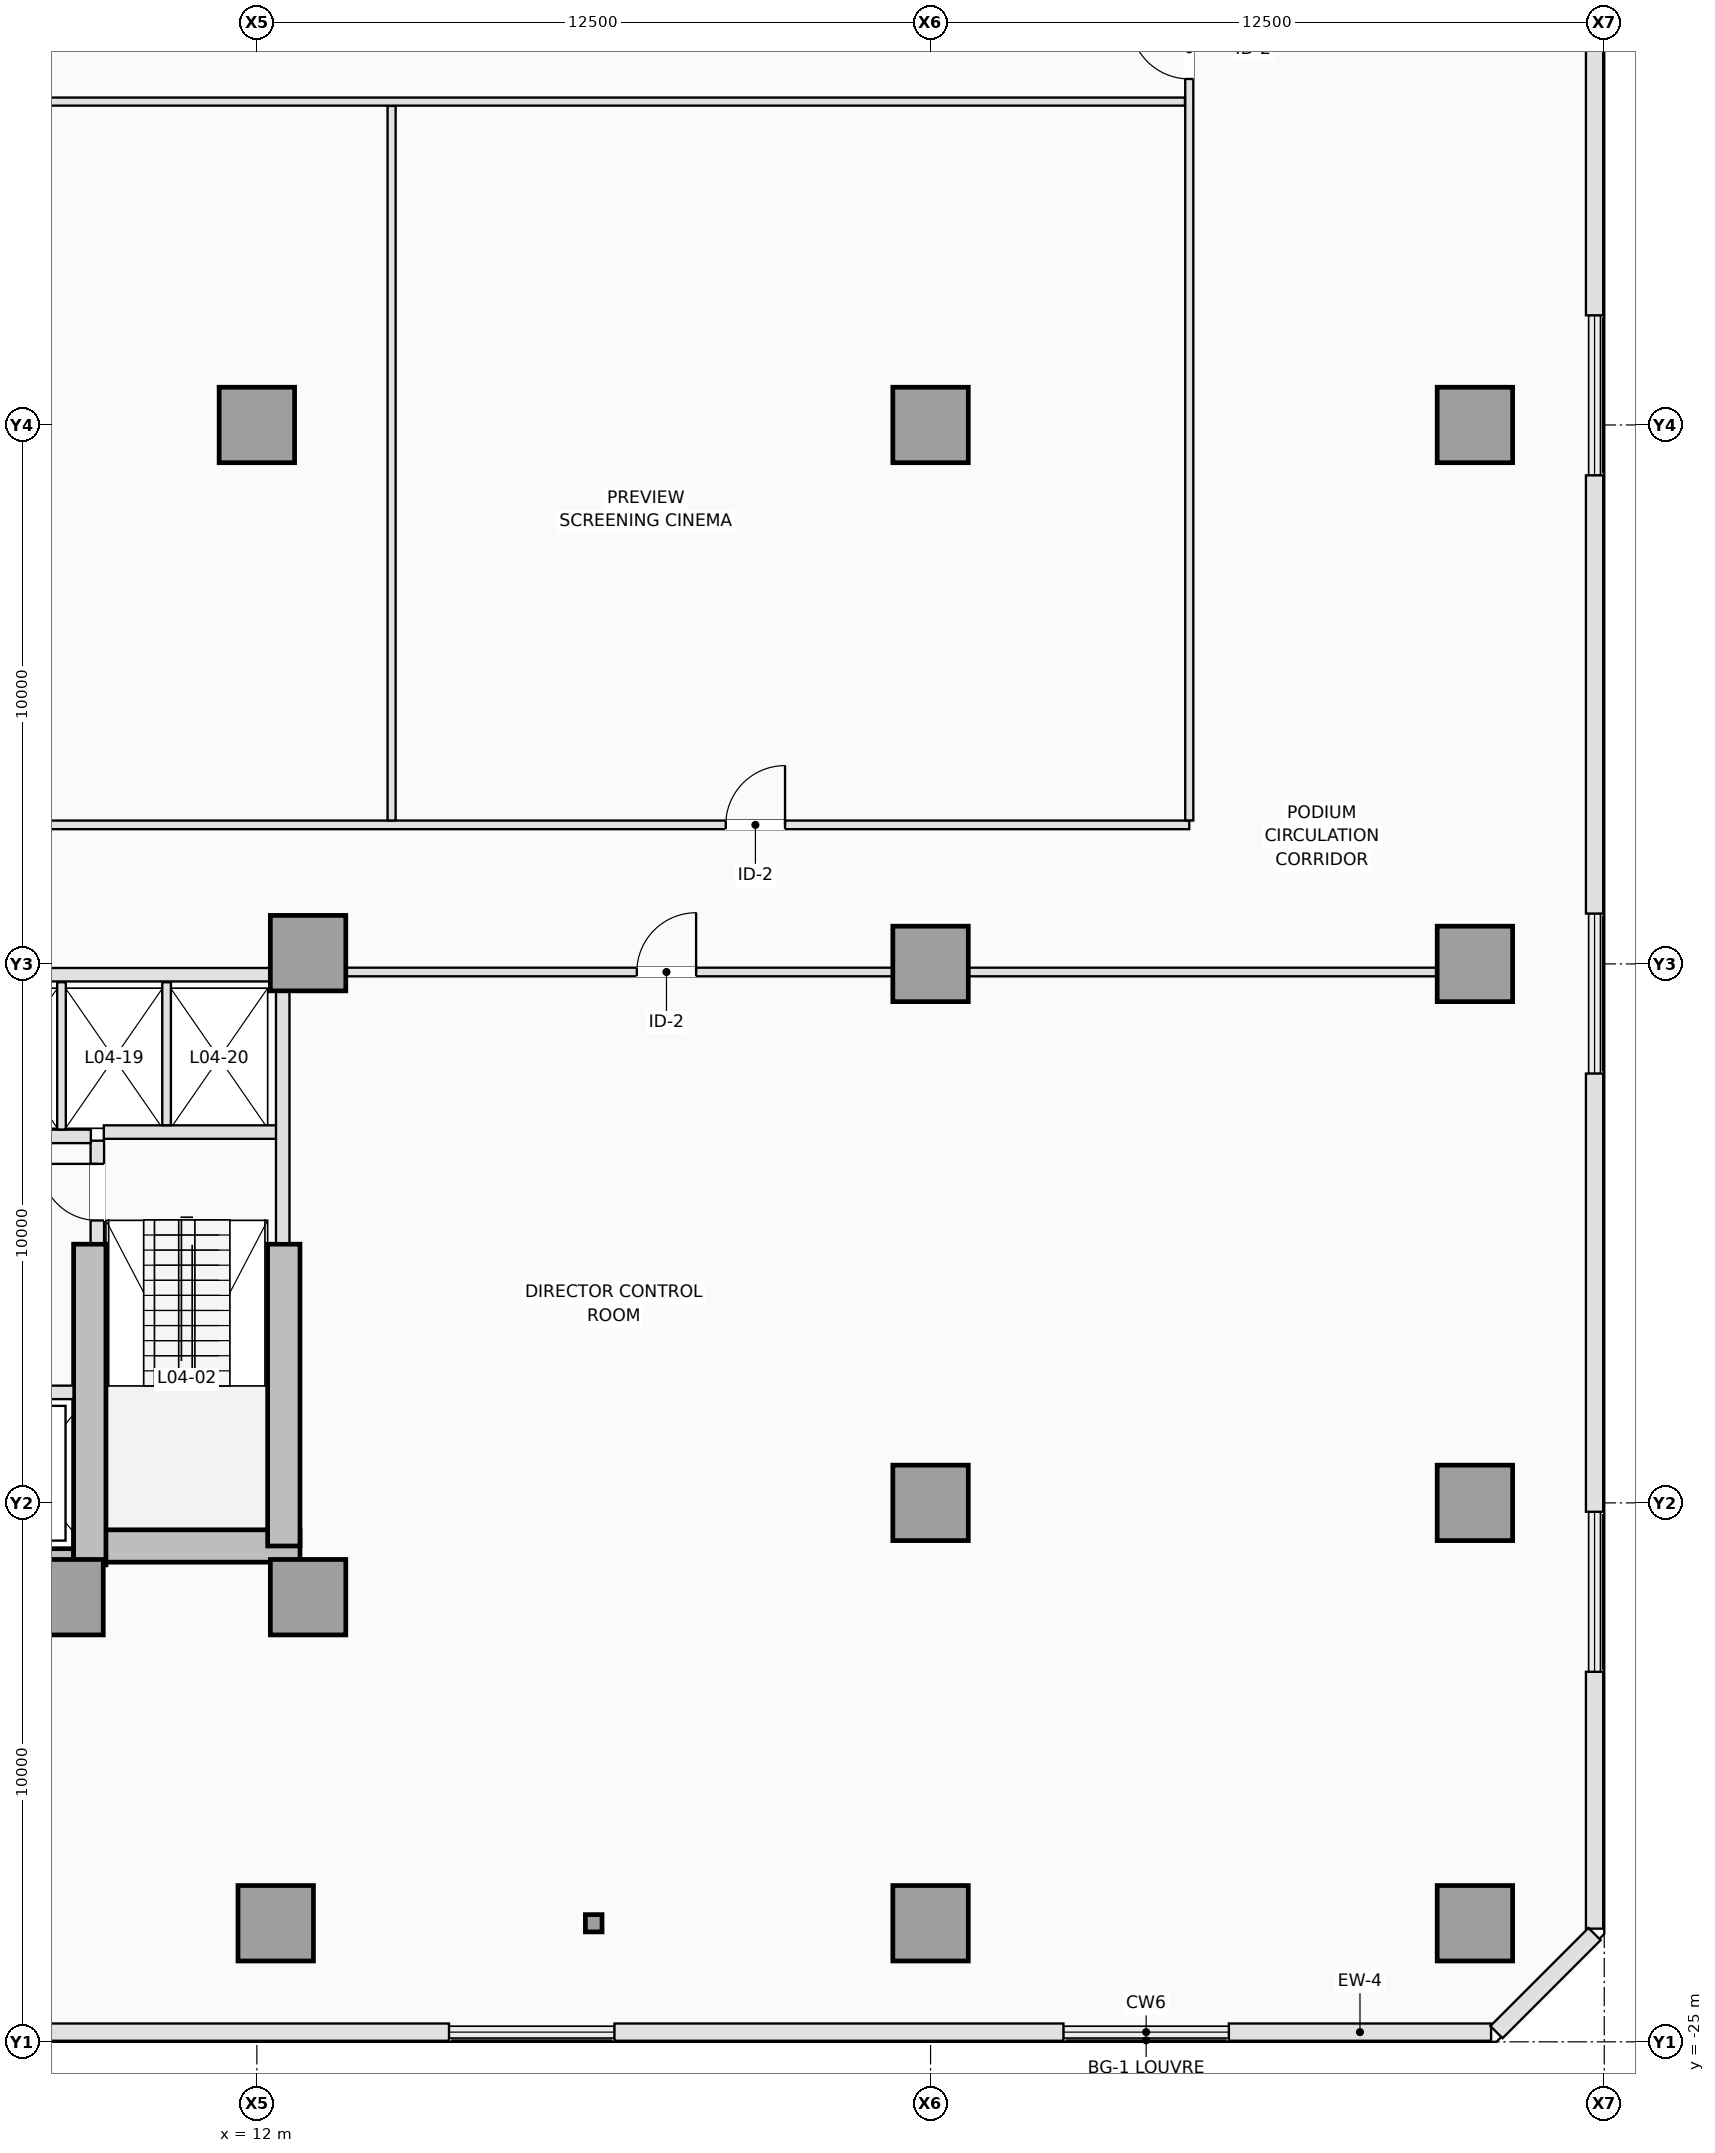
"""IFC4 building model, lengths in metres.
Left out: names, types, materials, properties, quantities, classifications, styles, units other than length and angle.
Written with IfcOpenShell. Run it as: python <this file> out.ifc"""

import sys

from ifc_helpers import new_model, si_unit, direction, frame, frame_2d, origin, origin_2d, place, context, subcontext, project, spatial, rectangle, i_section, extrude, element, fill, save


model = new_model("IFC4")
c1 = context("Model", 3, precision=1e-05, world=origin(), true_north=direction((0.0, 1.0)))
c2 = subcontext(c1, "Body", "Model", "MODEL_VIEW")
j1 = project(units=[si_unit("LENGTHUNIT", "METRE"), si_unit("PLANEANGLEUNIT", "RADIAN")], contexts=[c1])
p1 = place(None, origin())
s1 = spatial("IfcSite", under=j1, at=p1, CompositionType="ELEMENT")
p2 = place(p1, origin())
s2 = spatial("IfcBuilding", under=s1, at=p2, CompositionType="ELEMENT")
p3 = place(p2, frame((0.0, 0.0, 18.5)))
s3 = spatial("IfcBuildingStorey", under=s2, at=p3, CompositionType="ELEMENT", Elevation=18.5)
p4 = place(p3, frame((3.75, -16.15, 0.0), z_axis=(0.0, 0.0, 1.0), x_axis=(1.0, 0.0, 0.0)))
e1 = element("IfcWall", 1, at=p4, inside=s3, PredefinedType="SHEAR", context=c2, shape_type="SweptSolid", body=[
    extrude(rectangle(XDim=5.15, YDim=0.6, at=frame_2d((2.575, 0.0))), origin(), (0.0, 0.0, 1.0), 4.5),
])
p5 = place(p3, frame((8.6, -15.8, 0.0), z_axis=(0.0, 0.0, 1.0), x_axis=(1.0, 0.0, 0.0)))
e2 = element("IfcWall", 2, at=p5, inside=s3, PredefinedType="SHEAR", context=c2, shape_type="SweptSolid", body=[
    extrude(rectangle(XDim=4.2, YDim=0.6, at=frame_2d((2.1, 0.0))), origin(), (0.0, 0.0, 1.0), 4.5),
])
p6 = place(p3, frame((12.5, -15.8, 0.0), z_axis=(0.0, 0.0, 1.0), x_axis=(0.0, 1.0, 0.0)))
e3 = element("IfcWall", 3, at=p6, inside=s3, PredefinedType="SHEAR", context=c2, shape_type="SweptSolid", body=[
    extrude(rectangle(XDim=5.6, YDim=0.6, at=frame_2d((2.8, 0.0))), origin(), (0.0, 0.0, 1.0), 4.5),
])
p7 = place(p3, frame((8.9, -16.15, 0.0), z_axis=(0.0, 0.0, 1.0), x_axis=(0.0, 1.0, 0.0)))
e4 = element("IfcWall", 4, at=p7, inside=s3, PredefinedType="SHEAR", context=c2, shape_type="SweptSolid", body=[
    extrude(rectangle(XDim=5.95, YDim=0.6, at=frame_2d((2.975, 0.0))), origin(), (0.0, 0.0, 1.0), 4.5),
])
for number, where, z_axis, x_axis in (
    (5, (8.45, -16.75, 0.0), (0.0, 0.0, 1.0), (1.0, 0.0, 0.0)),
    (6, (12.95, -16.75, 0.0), (0.0, 0.0, 1.0), (1.0, 0.0, 0.0)),
    (7, (12.95, -4.8, 0.0), (0.0, 0.0, 1.0), (1.0, 0.0, 0.0)),
    (8, (12.35, -22.8, 0.0), (0.0, 0.0, 1.0), (1.0, 0.0, 0.0)),
    (9, (24.5, -22.8, 0.0), (0.0, 0.0, 1.0), (1.0, 0.0, 0.0)),
    (10, (34.6, -22.8, 0.0), (0.0, 0.0, 1.0), (1.0, 0.0, 0.0)),
    (11, (24.5, -15.0, 0.0), (0.0, 0.0, 1.0), (1.0, 0.0, 0.0)),
    (12, (34.6, -15.0, 0.0), (0.0, 0.0, 1.0), (1.0, 0.0, 0.0)),
    (13, (24.5, -5.0, 0.0), (0.0, 0.0, 1.0), (1.0, 0.0, 0.0)),
    (14, (34.6, -5.0, 0.0), (0.0, 0.0, 1.0), (1.0, 0.0, 0.0)),
    (15, (12.0, 5.0, 0.0), (0.0, 0.0, 1.0), (1.0, 0.0, 0.0)),
    (16, (24.5, 5.0, 0.0), (0.0, 0.0, 1.0), (1.0, 0.0, 0.0)),
    (17, (34.6, 5.0, 0.0), (0.0, 0.0, 1.0), (1.0, 0.0, 0.0)),
):
    element("IfcColumn", number, at=place(p3, frame(where, z_axis=z_axis, x_axis=x_axis)), inside=s3, PredefinedType="COLUMN", context=c2, shape_type="SweptSolid", body=[
        extrude(rectangle(XDim=1.4, YDim=1.4, at=origin_2d()), origin(), (0.0, 0.0, 1.0), 4.5),
    ])
p8 = place(p3, frame((18.25, -22.8, 0.0), z_axis=(0.0, 0.0, 1.0), x_axis=(1.0, 0.0, 0.0)))
e18 = element("IfcColumn", 18, at=p8, inside=s3, PredefinedType="COLUMN", context=c2, shape_type="SweptSolid", body=[
    extrude(i_section(OverallWidth=0.309, OverallDepth=0.321, WebThickness=0.014, FlangeThickness=0.022, FilletRadius=0.017, at=origin_2d()), origin(), (0.0, 0.0, 1.0), 4.5),
])
p9 = place(p3, frame((34.9, -24.82, 0.0), z_axis=(0.0, 0.0, 1.0), x_axis=(-1.0, 0.0, 0.0)))
e19 = element("IfcWall", 19, at=p9, inside=s3, PredefinedType="STANDARD", context=c2, shape_type="SweptSolid", body=[
    extrude(rectangle(XDim=4.865, YDim=0.32, at=frame_2d((2.433, 0.0))), origin(), (0.0, 0.0, 1.0), 4.08),
])
p10 = place(p3, frame((26.965, -24.82, 0.0), z_axis=(0.0, 0.0, 1.0), x_axis=(-1.0, 0.0, 0.0)))
e20 = element("IfcWall", 20, at=p10, inside=s3, PredefinedType="STANDARD", context=c2, shape_type="SweptSolid", body=[
    extrude(rectangle(XDim=8.33, YDim=0.32, at=frame_2d((4.165, 0.0))), origin(), (0.0, 0.0, 1.0), 4.08),
])
p11 = place(p3, frame((15.565, -24.82, 0.0), z_axis=(0.0, 0.0, 1.0), x_axis=(-1.0, 0.0, 0.0)))
e21 = element("IfcWall", 21, at=p11, inside=s3, PredefinedType="STANDARD", context=c2, shape_type="SweptSolid", body=[
    extrude(rectangle(XDim=8.33, YDim=0.32, at=frame_2d((4.165, 0.0))), origin(), (0.0, 0.0, 1.0), 4.08),
])
p12 = place(p3, frame((36.82, 15.165, 0.0), z_axis=(0.0, 0.0, 1.0), x_axis=(0.0, -1.0, 0.0)))
e22 = element("IfcWall", 22, at=p12, inside=s3, PredefinedType="STANDARD", context=c2, shape_type="SweptSolid", body=[
    extrude(rectangle(XDim=8.131, YDim=0.32, at=frame_2d((4.065, 0.0))), origin(), (0.0, 0.0, 1.0), 4.08),
])
p13 = place(p3, frame((36.82, 4.065, 0.0), z_axis=(0.0, 0.0, 1.0), x_axis=(0.0, -1.0, 0.0)))
e23 = element("IfcWall", 23, at=p13, inside=s3, PredefinedType="STANDARD", context=c2, shape_type="SweptSolid", body=[
    extrude(rectangle(XDim=8.131, YDim=0.32, at=frame_2d((4.065, 0.0))), origin(), (0.0, 0.0, 1.0), 4.08),
])
p14 = place(p3, frame((36.82, -7.035, 0.0), z_axis=(0.0, 0.0, 1.0), x_axis=(0.0, -1.0, 0.0)))
e24 = element("IfcWall", 24, at=p14, inside=s3, PredefinedType="STANDARD", context=c2, shape_type="SweptSolid", body=[
    extrude(rectangle(XDim=8.131, YDim=0.32, at=frame_2d((4.065, 0.0))), origin(), (0.0, 0.0, 1.0), 4.08),
])
p15 = place(p3, frame((36.82, -18.135, 0.0), z_axis=(0.0, 0.0, 1.0), x_axis=(0.0, -1.0, 0.0)))
e25 = element("IfcWall", 25, at=p15, inside=s3, PredefinedType="STANDARD", context=c2, shape_type="SweptSolid", body=[
    extrude(rectangle(XDim=4.765, YDim=0.32, at=frame_2d((2.383, 0.0))), origin(), (0.0, 0.0, 1.0), 4.08),
])
p16 = place(p3, frame((36.82, -23.0, 0.0), z_axis=(0.0, 0.0, 1.0), x_axis=(-0.707106781187, -0.707106781187, 0.0)))
e26 = element("IfcWall", 26, at=p16, inside=s3, PredefinedType="STANDARD", context=c2, shape_type="SweptSolid", body=[
    extrude(rectangle(XDim=2.574, YDim=0.32, at=frame_2d((1.287, 0.0))), origin(), (0.0, 0.0, 1.0), 4.08),
])
p17 = place(p3, frame((9.04, -10.18, 0.0), z_axis=(0.0, 0.0, 1.0), x_axis=(0.0, 1.0, 0.0)))
e27 = element("IfcWall", 27, at=p17, inside=s3, PredefinedType="PARTITIONING", context=c2, shape_type="SweptSolid", body=[
    extrude(rectangle(XDim=1.9, YDim=0.25, at=frame_2d((0.95, 0.0))), origin(), (0.0, 0.0, 1.0), 4.08),
])
p18 = place(p17, frame((0.42, 0.0, 0.0)))
e28 = element("IfcOpeningElement", 28, at=p18, cuts=e27, PredefinedType="OPENING", context=c2, shape_type="SweptSolid", body=[
    extrude(rectangle(XDim=1.05, YDim=2.15, at=frame_2d((0.525, 1.075))), frame((0.0, 0.135, 0.0), z_axis=(0.0, -1.0, 0.0), x_axis=(1.0, 0.0, 0.0)), (0.0, 0.0, 1.0), 0.27),
])
p19 = place(p3, frame((9.16, -8.12, 0.0), z_axis=(0.0, 0.0, 1.0), x_axis=(1.0, 0.0, 0.0)))
e29 = element("IfcWall", 29, at=p19, inside=s3, PredefinedType="PARTITIONING", context=c2, shape_type="SweptSolid", body=[
    extrude(rectangle(XDim=3.22, YDim=0.25, at=frame_2d((1.61, 0.0))), origin(), (0.0, 0.0, 1.0), 4.08),
])
p20 = place(p3, frame((12.48, -10.18, 0.0), z_axis=(0.0, 0.0, 1.0), x_axis=(0.0, 1.0, 0.0)))
e30 = element("IfcWall", 30, at=p20, inside=s3, PredefinedType="PARTITIONING", context=c2, shape_type="SweptSolid", body=[
    extrude(rectangle(XDim=4.678, YDim=0.25, at=frame_2d((2.339, 0.0))), origin(), (0.0, 0.0, 1.0), 4.08),
])
p21 = place(p3, frame((3.68, -12.95, 0.0), z_axis=(0.0, 0.0, 1.0), x_axis=(1.0, 0.0, 0.0)))
e31 = element("IfcWall", 31, at=p21, inside=s3, PredefinedType="PARTITIONING", context=c2, shape_type="SweptSolid", body=[
    extrude(rectangle(XDim=4.918, YDim=0.25, at=frame_2d((2.459, 0.0))), origin(), (0.0, 0.0, 1.0), 4.08),
])
p22 = place(p21, frame((3.32, 0.0, 0.0)))
e32 = element("IfcOpeningElement", 32, at=p22, cuts=e31, PredefinedType="OPENING", context=c2, shape_type="SweptSolid", body=[
    extrude(rectangle(XDim=1.1, YDim=2.15, at=frame_2d((0.55, 1.075))), frame((0.0, 0.135, 0.0), z_axis=(0.0, -1.0, 0.0), x_axis=(1.0, 0.0, 0.0)), (0.0, 0.0, 1.0), 0.27),
])
p23 = place(p21, frame((0.67, 0.0, 0.0)))
e33 = element("IfcOpeningElement", 33, at=p23, cuts=e31, PredefinedType="OPENING", context=c2, shape_type="SweptSolid", body=[
    extrude(rectangle(XDim=1.2, YDim=2.15, at=frame_2d((0.6, 1.075))), frame((0.0, 0.135, 0.0), z_axis=(0.0, -1.0, 0.0), x_axis=(1.0, 0.0, 0.0)), (0.0, 0.0, 1.0), 0.27),
])
p24 = place(p3, frame((3.68, -8.2, 0.0), z_axis=(0.0, 0.0, 1.0), x_axis=(1.0, 0.0, 0.0)))
e34 = element("IfcWall", 34, at=p24, inside=s3, PredefinedType="PARTITIONING", context=c2, shape_type="SweptSolid", body=[
    extrude(rectangle(XDim=5.24, YDim=0.25, at=frame_2d((2.62, 0.0))), origin(), (0.0, 0.0, 1.0), 4.08),
])
p25 = place(p3, frame((4.452, -5.2, 0.0), z_axis=(0.0, 0.0, 1.0), x_axis=(1.0, 0.0, 0.0)))
e35 = element("IfcWall", 35, at=p25, inside=s3, PredefinedType="PARTITIONING", context=c2, shape_type="SweptSolid", body=[
    extrude(rectangle(XDim=7.796, YDim=0.25, at=frame_2d((3.898, 0.0))), origin(), (0.0, 0.0, 1.0), 4.08),
])
p26 = place(p3, frame((8.375, -8.073, 0.0), z_axis=(0.0, 0.0, 1.0), x_axis=(0.0, 1.0, 0.0)))
e36 = element("IfcWall", 36, at=p26, inside=s3, PredefinedType="PARTITIONING", context=c2, shape_type="SweptSolid", body=[
    extrude(rectangle(XDim=2.733, YDim=0.16, at=frame_2d((1.366, 0.0))), origin(), (0.0, 0.0, 1.0), 4.08),
])
p27 = place(p3, frame((10.325, -7.993, 0.0), z_axis=(0.0, 0.0, 1.0), x_axis=(0.0, 1.0, 0.0)))
e37 = element("IfcWall", 37, at=p27, inside=s3, PredefinedType="PARTITIONING", context=c2, shape_type="SweptSolid", body=[
    extrude(rectangle(XDim=2.653, YDim=0.16, at=frame_2d((1.326, 0.0))), origin(), (0.0, 0.0, 1.0), 4.08),
])
p28 = place(p3, frame((-29.3, -2.42, 0.0), z_axis=(0.0, 0.0, 1.0), x_axis=(1.0, 0.0, 0.0)))
e38 = element("IfcWall", 38, at=p28, inside=s3, PredefinedType="PARTITIONING", context=c2, shape_type="SweptSolid", body=[
    extrude(rectangle(XDim=58.6, YDim=0.16, at=frame_2d((29.3, 0.0))), origin(), (0.0, 0.0, 1.0), 4.08),
])
p29 = place(p28, frame((5.5, 0.0, 0.0)))
e39 = element("IfcOpeningElement", 39, at=p29, cuts=e38, PredefinedType="OPENING", context=c2, shape_type="SweptSolid", body=[
    extrude(rectangle(XDim=1.1, YDim=2.15, at=frame_2d((0.55, 1.075))), frame((0.0, 0.09, 0.0), z_axis=(0.0, -1.0, 0.0), x_axis=(1.0, 0.0, 0.0)), (0.0, 0.0, 1.0), 0.18),
])
p30 = place(p28, frame((50.0, 0.0, 0.0)))
e40 = element("IfcOpeningElement", 40, at=p30, cuts=e38, PredefinedType="OPENING", context=c2, shape_type="SweptSolid", body=[
    extrude(rectangle(XDim=1.1, YDim=2.15, at=frame_2d((0.55, 1.075))), frame((0.0, 0.09, 0.0), z_axis=(0.0, -1.0, 0.0), x_axis=(1.0, 0.0, 0.0)), (0.0, 0.0, 1.0), 0.18),
])
p31 = place(p3, frame((13.652, -5.15, 0.0), z_axis=(0.0, 0.0, 1.0), x_axis=(1.0, 0.0, 0.0)))
e41 = element("IfcWall", 41, at=p31, inside=s3, PredefinedType="PARTITIONING", context=c2, shape_type="SweptSolid", body=[
    extrude(rectangle(XDim=10.146, YDim=0.16, at=frame_2d((5.073, 0.0))), origin(), (0.0, 0.0, 1.0), 3.056),
])
p32 = place(p31, frame((5.398, 0.0, 0.0)))
e42 = element("IfcOpeningElement", 42, at=p32, cuts=e41, PredefinedType="OPENING", context=c2, shape_type="SweptSolid", body=[
    extrude(rectangle(XDim=1.1, YDim=2.15, at=frame_2d((0.55, 1.075))), frame((0.0, 0.09, 0.0), z_axis=(0.0, -1.0, 0.0), x_axis=(1.0, 0.0, 0.0)), (0.0, 0.0, 1.0), 0.18),
])
p33 = place(p3, frame((25.202, -5.15, 0.0), z_axis=(0.0, 0.0, 1.0), x_axis=(1.0, 0.0, 0.0)))
e43 = element("IfcWall", 43, at=p33, inside=s3, PredefinedType="PARTITIONING", context=c2, shape_type="SweptSolid", body=[
    extrude(rectangle(XDim=8.696, YDim=0.16, at=frame_2d((4.348, 0.0))), origin(), (0.0, 0.0, 1.0), 3.056),
])
p34 = place(p3, frame((29.3, -2.338, 0.0), z_axis=(0.0, 0.0, 1.0), x_axis=(0.0, 1.0, 0.0)))
e44 = element("IfcWall", 44, at=p34, inside=s3, PredefinedType="PARTITIONING", context=c2, shape_type="SweptSolid", body=[
    extrude(rectangle(XDim=15.088, YDim=0.15, at=frame_2d((7.544, 0.0))), origin(), (0.0, 0.0, 1.0), 4.08),
])
p35 = place(p34, frame((13.758, 0.0, 0.0)))
e45 = element("IfcOpeningElement", 45, at=p35, cuts=e44, PredefinedType="OPENING", context=c2, shape_type="SweptSolid", body=[
    extrude(rectangle(XDim=1.1, YDim=2.15, at=frame_2d((0.55, 1.075))), frame((0.0, 0.085, 0.0), z_axis=(0.0, -1.0, 0.0), x_axis=(1.0, 0.0, 0.0)), (0.0, 0.0, 1.0), 0.17),
])
p36 = place(p3, frame((14.5, -2.338, 0.0), z_axis=(0.0, 0.0, 1.0), x_axis=(0.0, 1.0, 0.0)))
e46 = element("IfcWall", 46, at=p36, inside=s3, PredefinedType="PARTITIONING", context=c2, shape_type="SweptSolid", body=[
    extrude(rectangle(XDim=13.258, YDim=0.15, at=frame_2d((6.629, 0.0))), origin(), (0.0, 0.0, 1.0), 4.08),
])
p37 = place(p3, frame((-29.22, 11.0, 0.0), z_axis=(0.0, 0.0, 1.0), x_axis=(1.0, 0.0, 0.0)))
e47 = element("IfcWall", 47, at=p37, inside=s3, PredefinedType="PARTITIONING", context=c2, shape_type="SweptSolid", body=[
    extrude(rectangle(XDim=58.44, YDim=0.15, at=frame_2d((29.22, 0.0))), origin(), (0.0, 0.0, 1.0), 4.08),
])
p38 = place(p18, origin())
e48 = element("IfcDoor", 48, at=p38, inside=s3, OperationType="SINGLE_SWING_RIGHT", PredefinedType="DOOR", context=c2, shape_type="SweptSolid", body=[
    extrude(rectangle(XDim=1.05, YDim=2.15, at=frame_2d((0.525, 1.075))), frame((0.0, 0.025, 0.0), z_axis=(0.0, -1.0, 0.0), x_axis=(1.0, 0.0, 0.0)), (0.0, 0.0, 1.0), 0.05),
])
fill(e28, e48)
p39 = place(p32, origin())
e49 = element("IfcDoor", 49, at=p39, inside=s3, OperationType="SINGLE_SWING_RIGHT", PredefinedType="DOOR", context=c2, shape_type="SweptSolid", body=[
    extrude(rectangle(XDim=1.1, YDim=2.15, at=frame_2d((0.55, 1.075))), frame((0.0, 0.025, 0.0), z_axis=(0.0, -1.0, 0.0), x_axis=(1.0, 0.0, 0.0)), (0.0, 0.0, 1.0), 0.05),
])
fill(e42, e49)
p40 = place(p30, origin())
e50 = element("IfcDoor", 50, at=p40, inside=s3, OperationType="SINGLE_SWING_RIGHT", PredefinedType="DOOR", context=c2, shape_type="SweptSolid", body=[
    extrude(rectangle(XDim=1.1, YDim=2.15, at=frame_2d((0.55, 1.075))), frame((0.0, 0.025, 0.0), z_axis=(0.0, -1.0, 0.0), x_axis=(1.0, 0.0, 0.0)), (0.0, 0.0, 1.0), 0.05),
])
fill(e40, e50)
p41 = place(p35, origin())
e51 = element("IfcDoor", 51, at=p41, inside=s3, OperationType="SINGLE_SWING_RIGHT", PredefinedType="DOOR", context=c2, shape_type="SweptSolid", body=[
    extrude(rectangle(XDim=1.1, YDim=2.15, at=frame_2d((0.55, 1.075))), frame((0.0, 0.025, 0.0), z_axis=(0.0, -1.0, 0.0), x_axis=(1.0, 0.0, 0.0)), (0.0, 0.0, 1.0), 0.05),
])
fill(e45, e51)
save(model, sys.argv[1])
